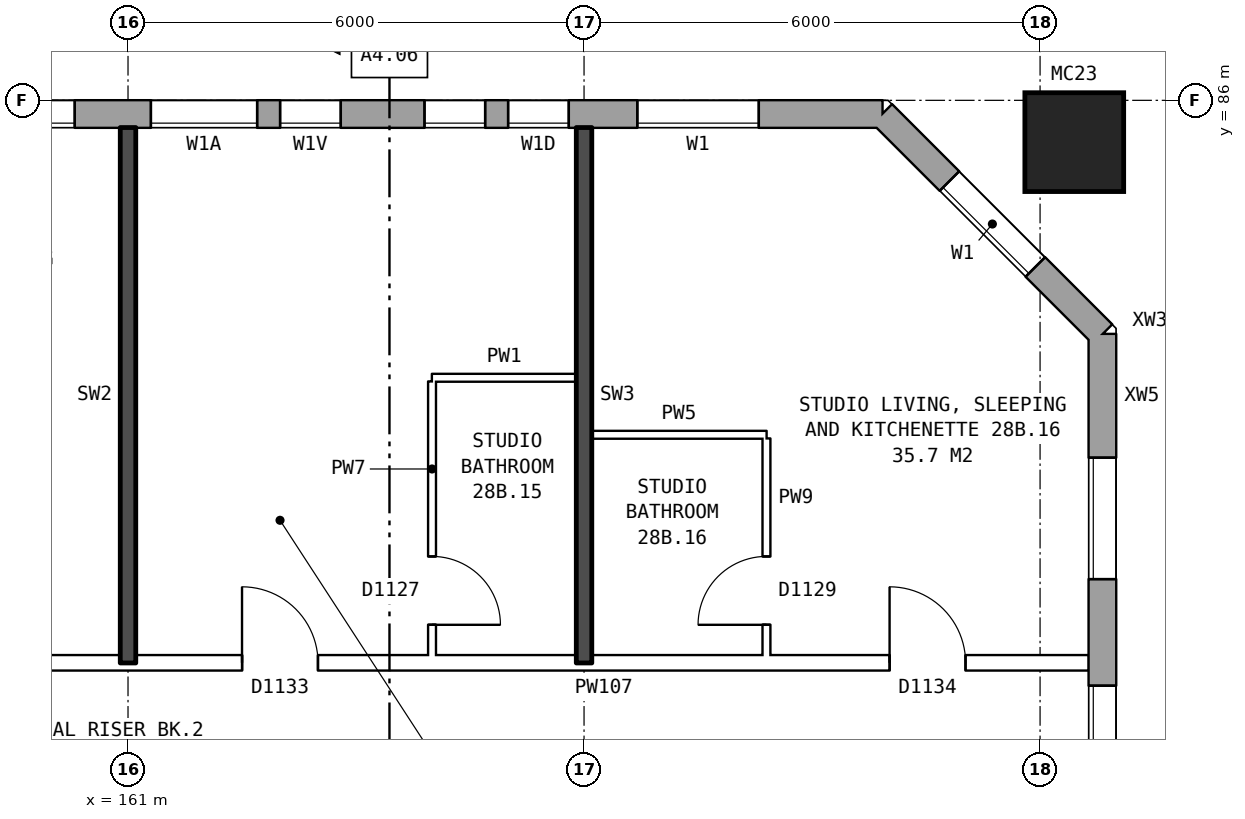
"""IFC4 building model, lengths in metres.
Left out: names, types, materials, properties, quantities, classifications, styles, units other than length and angle.
Written with IfcOpenShell. Run it as: python <this file> out.ifc"""

import sys

from ifc_helpers import new_model, si_unit, direction, frame, frame_2d, origin, origin_2d, place, context, subcontext, project, spatial, rectangle, hollow_rectangle, extrude, element, fill, save


model = new_model("IFC4")
c1 = context("Model", 3, precision=1e-05, world=origin(), true_north=direction((0.0, 1.0)))
c2 = subcontext(c1, "Body", "Model", "MODEL_VIEW")
j1 = project(units=[si_unit("LENGTHUNIT", "METRE"), si_unit("PLANEANGLEUNIT", "RADIAN")], contexts=[c1])
p1 = place(None, origin())
s1 = spatial("IfcSite", under=j1, at=p1, CompositionType="ELEMENT")
p2 = place(p1, origin())
s2 = spatial("IfcBuilding", under=s1, at=p2, CompositionType="ELEMENT")
p3 = place(p2, frame((0.0, 0.0, 102.6)))
s3 = spatial("IfcBuildingStorey", under=s2, at=p3, CompositionType="ELEMENT", Elevation=102.6)
p4 = place(p3, frame((173.45, 85.45, 0.0), z_axis=(0.0, 0.0, 1.0), x_axis=(1.0, 0.0, 0.0)))
e1 = element("IfcColumn", 1, at=p4, inside=s3, PredefinedType="COLUMN", context=c2, shape_type="SweptSolid", body=[
    extrude(hollow_rectangle(XDim=1.3, YDim=1.3, WallThickness=0.07, at=origin_2d()), origin(), (0.0, 0.0, 1.0), 3.1),
])
p5 = place(p3, frame((173.82, 57.075, 0.0), z_axis=(0.0, 0.0, 1.0), x_axis=(0.0, 1.0, 0.0)))
e2 = element("IfcWall", 2, at=p5, inside=s3, PredefinedType="STANDARD", context=c2, shape_type="SweptSolid", body=[
    extrude(rectangle(XDim=25.851, YDim=0.36, at=frame_2d((12.925, 0.0))), origin(), (0.0, 0.0, 1.0), 2.85),
])
p6 = place(p5, frame((1.625, 0.0, 0.8)))
e3 = element("IfcOpeningElement", 3, at=p6, cuts=e2, PredefinedType="OPENING", context=c2, shape_type="SweptSolid", body=[
    extrude(rectangle(XDim=1.6, YDim=1.8, at=frame_2d((0.8, 0.9))), frame((0.0, 0.19, 0.0), z_axis=(0.0, -1.0, 0.0), x_axis=(1.0, 0.0, 0.0)), (0.0, 0.0, 1.0), 0.38),
])
p7 = place(p5, frame((4.625, 0.0, 0.8)))
e4 = element("IfcOpeningElement", 4, at=p7, cuts=e2, PredefinedType="OPENING", context=c2, shape_type="SweptSolid", body=[
    extrude(rectangle(XDim=1.6, YDim=1.8, at=frame_2d((0.8, 0.9))), frame((0.0, 0.19, 0.0), z_axis=(0.0, -1.0, 0.0), x_axis=(1.0, 0.0, 0.0)), (0.0, 0.0, 1.0), 0.38),
])
p8 = place(p5, frame((7.625, 0.0, 0.8)))
e5 = element("IfcOpeningElement", 5, at=p8, cuts=e2, PredefinedType="OPENING", context=c2, shape_type="SweptSolid", body=[
    extrude(rectangle(XDim=1.6, YDim=1.8, at=frame_2d((0.8, 0.9))), frame((0.0, 0.19, 0.0), z_axis=(0.0, -1.0, 0.0), x_axis=(1.0, 0.0, 0.0)), (0.0, 0.0, 1.0), 0.38),
])
p9 = place(p5, frame((6.525, 0.0, 0.8)))
e6 = element("IfcOpeningElement", 6, at=p9, cuts=e2, PredefinedType="OPENING", context=c2, shape_type="SweptSolid", body=[
    extrude(rectangle(XDim=0.8, YDim=1.8, at=frame_2d((0.4, 0.9))), frame((0.0, 0.19, 0.0), z_axis=(0.0, -1.0, 0.0), x_axis=(1.0, 0.0, 0.0)), (0.0, 0.0, 1.0), 0.38),
])
p10 = place(p5, frame((9.525, 0.0, 1.7)))
e7 = element("IfcOpeningElement", 7, at=p10, cuts=e2, PredefinedType="OPENING", context=c2, shape_type="SweptSolid", body=[
    extrude(rectangle(XDim=0.8, YDim=0.9, at=frame_2d((0.4, 0.45))), frame((0.0, 0.19, 0.0), z_axis=(0.0, -1.0, 0.0), x_axis=(1.0, 0.0, 0.0)), (0.0, 0.0, 1.0), 0.38),
])
p11 = place(p5, frame((16.625, 0.0, 0.8)))
e8 = element("IfcOpeningElement", 8, at=p11, cuts=e2, PredefinedType="OPENING", context=c2, shape_type="SweptSolid", body=[
    extrude(rectangle(XDim=1.6, YDim=1.8, at=frame_2d((0.8, 0.9))), frame((0.0, 0.19, 0.0), z_axis=(0.0, -1.0, 0.0), x_axis=(1.0, 0.0, 0.0)), (0.0, 0.0, 1.0), 0.38),
])
p12 = place(p5, frame((19.625, 0.0, 0.8)))
e9 = element("IfcOpeningElement", 9, at=p12, cuts=e2, PredefinedType="OPENING", context=c2, shape_type="SweptSolid", body=[
    extrude(rectangle(XDim=1.6, YDim=1.8, at=frame_2d((0.8, 0.9))), frame((0.0, 0.19, 0.0), z_axis=(0.0, -1.0, 0.0), x_axis=(1.0, 0.0, 0.0)), (0.0, 0.0, 1.0), 0.38),
])
p13 = place(p5, frame((22.625, 0.0, 0.8)))
e10 = element("IfcOpeningElement", 10, at=p13, cuts=e2, PredefinedType="OPENING", context=c2, shape_type="SweptSolid", body=[
    extrude(rectangle(XDim=1.6, YDim=1.8, at=frame_2d((0.8, 0.9))), frame((0.0, 0.19, 0.0), z_axis=(0.0, -1.0, 0.0), x_axis=(1.0, 0.0, 0.0)), (0.0, 0.0, 1.0), 0.38),
])
p14 = place(p5, frame((11.425, 0.0, 0.8)))
e11 = element("IfcOpeningElement", 11, at=p14, cuts=e2, PredefinedType="OPENING", context=c2, shape_type="SweptSolid", body=[
    extrude(rectangle(XDim=0.6, YDim=0.9, at=frame_2d((0.3, 0.45))), frame((0.0, 0.19, 0.0), z_axis=(0.0, -1.0, 0.0), x_axis=(1.0, 0.0, 0.0)), (0.0, 0.0, 1.0), 0.38),
])
p15 = place(p5, frame((12.325, 0.0, 0.8)))
e12 = element("IfcOpeningElement", 12, at=p15, cuts=e2, PredefinedType="OPENING", context=c2, shape_type="SweptSolid", body=[
    extrude(rectangle(XDim=1.2, YDim=1.8, at=frame_2d((0.6, 0.9))), frame((0.0, 0.19, 0.0), z_axis=(0.0, -1.0, 0.0), x_axis=(1.0, 0.0, 0.0)), (0.0, 0.0, 1.0), 0.38),
])
p16 = place(p5, frame((13.825, 0.0, 0.8)))
e13 = element("IfcOpeningElement", 13, at=p16, cuts=e2, PredefinedType="OPENING", context=c2, shape_type="SweptSolid", body=[
    extrude(rectangle(XDim=0.6, YDim=0.9, at=frame_2d((0.3, 0.45))), frame((0.0, 0.19, 0.0), z_axis=(0.0, -1.0, 0.0), x_axis=(1.0, 0.0, 0.0)), (0.0, 0.0, 1.0), 0.38),
])
p17 = place(p5, frame((15.525, 0.0, 1.7)))
e14 = element("IfcOpeningElement", 14, at=p17, cuts=e2, PredefinedType="OPENING", context=c2, shape_type="SweptSolid", body=[
    extrude(rectangle(XDim=0.6, YDim=0.9, at=frame_2d((0.3, 0.45))), frame((0.0, 0.19, 0.0), z_axis=(0.0, -1.0, 0.0), x_axis=(1.0, 0.0, 0.0)), (0.0, 0.0, 1.0), 0.38),
])
p18 = place(p5, frame((18.525, 0.0, 0.8)))
e15 = element("IfcOpeningElement", 15, at=p18, cuts=e2, PredefinedType="OPENING", context=c2, shape_type="SweptSolid", body=[
    extrude(rectangle(XDim=0.8, YDim=1.8, at=frame_2d((0.4, 0.9))), frame((0.0, 0.19, 0.0), z_axis=(0.0, -1.0, 0.0), x_axis=(1.0, 0.0, 0.0)), (0.0, 0.0, 1.0), 0.38),
])
p19 = place(p3, frame((173.82, 82.925, 0.0), z_axis=(0.0, 0.0, 1.0), x_axis=(-0.707106781187, 0.707106781187, 0.0)))
e16 = element("IfcWall", 16, at=p19, inside=s3, PredefinedType="STANDARD", context=c2, shape_type="SweptSolid", body=[
    extrude(rectangle(XDim=4.094, YDim=0.36, at=frame_2d((2.047, 0.0))), origin(), (0.0, 0.0, 1.0), 2.85),
])
p20 = place(p19, frame((1.247, 0.0, 0.8)))
e17 = element("IfcOpeningElement", 17, at=p20, cuts=e16, PredefinedType="OPENING", context=c2, shape_type="SweptSolid", body=[
    extrude(rectangle(XDim=1.6, YDim=1.8, at=frame_2d((0.8, 0.9))), frame((0.0, 0.19, 0.0), z_axis=(0.0, -1.0, 0.0), x_axis=(1.0, 0.0, 0.0)), (0.0, 0.0, 1.0), 0.38),
])
p21 = place(p3, frame((170.925, 85.82, 0.0), z_axis=(0.0, 0.0, 1.0), x_axis=(-1.0, 0.0, 0.0)))
e18 = element("IfcWall", 18, at=p21, inside=s3, PredefinedType="STANDARD", context=c2, shape_type="SweptSolid", body=[
    extrude(rectangle(XDim=36.851, YDim=0.36, at=frame_2d((18.425, 0.0))), origin(), (0.0, 0.0, 1.0), 2.85),
])
p22 = place(p21, frame((1.625, 0.0, 0.8)))
e19 = element("IfcOpeningElement", 19, at=p22, cuts=e18, PredefinedType="OPENING", context=c2, shape_type="SweptSolid", body=[
    extrude(rectangle(XDim=1.6, YDim=1.8, at=frame_2d((0.8, 0.9))), frame((0.0, 0.19, 0.0), z_axis=(0.0, -1.0, 0.0), x_axis=(1.0, 0.0, 0.0)), (0.0, 0.0, 1.0), 0.38),
])
p23 = place(p21, frame((4.125, 0.0, 0.8)))
e20 = element("IfcOpeningElement", 20, at=p23, cuts=e18, PredefinedType="OPENING", context=c2, shape_type="SweptSolid", body=[
    extrude(rectangle(XDim=0.8, YDim=1.8, at=frame_2d((0.4, 0.9))), frame((0.0, 0.19, 0.0), z_axis=(0.0, -1.0, 0.0), x_axis=(1.0, 0.0, 0.0)), (0.0, 0.0, 1.0), 0.38),
])
p24 = place(p21, frame((5.225, 0.0, 1.7)))
e21 = element("IfcOpeningElement", 21, at=p24, cuts=e18, PredefinedType="OPENING", context=c2, shape_type="SweptSolid", body=[
    extrude(rectangle(XDim=0.8, YDim=0.9, at=frame_2d((0.4, 0.45))), frame((0.0, 0.19, 0.0), z_axis=(0.0, -1.0, 0.0), x_axis=(1.0, 0.0, 0.0)), (0.0, 0.0, 1.0), 0.38),
])
p25 = place(p21, frame((10.625, 0.0, 0.8)))
e22 = element("IfcOpeningElement", 22, at=p25, cuts=e18, PredefinedType="OPENING", context=c2, shape_type="SweptSolid", body=[
    extrude(rectangle(XDim=1.6, YDim=1.8, at=frame_2d((0.8, 0.9))), frame((0.0, 0.19, 0.0), z_axis=(0.0, -1.0, 0.0), x_axis=(1.0, 0.0, 0.0)), (0.0, 0.0, 1.0), 0.38),
])
p26 = place(p21, frame((13.625, 0.0, 0.8)))
e23 = element("IfcOpeningElement", 23, at=p26, cuts=e18, PredefinedType="OPENING", context=c2, shape_type="SweptSolid", body=[
    extrude(rectangle(XDim=1.6, YDim=1.8, at=frame_2d((0.8, 0.9))), frame((0.0, 0.19, 0.0), z_axis=(0.0, -1.0, 0.0), x_axis=(1.0, 0.0, 0.0)), (0.0, 0.0, 1.0), 0.38),
])
p27 = place(p21, frame((16.625, 0.0, 0.8)))
e24 = element("IfcOpeningElement", 24, at=p27, cuts=e18, PredefinedType="OPENING", context=c2, shape_type="SweptSolid", body=[
    extrude(rectangle(XDim=1.6, YDim=1.8, at=frame_2d((0.8, 0.9))), frame((0.0, 0.19, 0.0), z_axis=(0.0, -1.0, 0.0), x_axis=(1.0, 0.0, 0.0)), (0.0, 0.0, 1.0), 0.38),
])
p28 = place(p21, frame((19.625, 0.0, 0.8)))
e25 = element("IfcOpeningElement", 25, at=p28, cuts=e18, PredefinedType="OPENING", context=c2, shape_type="SweptSolid", body=[
    extrude(rectangle(XDim=1.6, YDim=1.8, at=frame_2d((0.8, 0.9))), frame((0.0, 0.19, 0.0), z_axis=(0.0, -1.0, 0.0), x_axis=(1.0, 0.0, 0.0)), (0.0, 0.0, 1.0), 0.38),
])
p29 = place(p21, frame((22.625, 0.0, 0.8)))
e26 = element("IfcOpeningElement", 26, at=p29, cuts=e18, PredefinedType="OPENING", context=c2, shape_type="SweptSolid", body=[
    extrude(rectangle(XDim=1.6, YDim=1.8, at=frame_2d((0.8, 0.9))), frame((0.0, 0.19, 0.0), z_axis=(0.0, -1.0, 0.0), x_axis=(1.0, 0.0, 0.0)), (0.0, 0.0, 1.0), 0.38),
])
p30 = place(p21, frame((25.625, 0.0, 0.8)))
e27 = element("IfcOpeningElement", 27, at=p30, cuts=e18, PredefinedType="OPENING", context=c2, shape_type="SweptSolid", body=[
    extrude(rectangle(XDim=1.6, YDim=1.8, at=frame_2d((0.8, 0.9))), frame((0.0, 0.19, 0.0), z_axis=(0.0, -1.0, 0.0), x_axis=(1.0, 0.0, 0.0)), (0.0, 0.0, 1.0), 0.38),
])
p31 = place(p21, frame((28.125, 0.0, 0.8)))
e28 = element("IfcOpeningElement", 28, at=p31, cuts=e18, PredefinedType="OPENING", context=c2, shape_type="SweptSolid", body=[
    extrude(rectangle(XDim=1.2, YDim=1.2, at=frame_2d((0.6, 0.6))), frame((0.0, 0.19, 0.0), z_axis=(0.0, -1.0, 0.0), x_axis=(1.0, 0.0, 0.0)), (0.0, 0.0, 1.0), 0.38),
])
p32 = place(p21, frame((31.625, 0.0, 0.8)))
e29 = element("IfcOpeningElement", 29, at=p32, cuts=e18, PredefinedType="OPENING", context=c2, shape_type="SweptSolid", body=[
    extrude(rectangle(XDim=1.6, YDim=1.8, at=frame_2d((0.8, 0.9))), frame((0.0, 0.19, 0.0), z_axis=(0.0, -1.0, 0.0), x_axis=(1.0, 0.0, 0.0)), (0.0, 0.0, 1.0), 0.38),
])
p33 = place(p21, frame((34.625, 0.0, 0.8)))
e30 = element("IfcOpeningElement", 30, at=p33, cuts=e18, PredefinedType="OPENING", context=c2, shape_type="SweptSolid", body=[
    extrude(rectangle(XDim=1.6, YDim=1.8, at=frame_2d((0.8, 0.9))), frame((0.0, 0.19, 0.0), z_axis=(0.0, -1.0, 0.0), x_axis=(1.0, 0.0, 0.0)), (0.0, 0.0, 1.0), 0.38),
])
p34 = place(p21, frame((7.125, 0.0, 0.8)))
e31 = element("IfcOpeningElement", 31, at=p34, cuts=e18, PredefinedType="OPENING", context=c2, shape_type="SweptSolid", body=[
    extrude(rectangle(XDim=0.8, YDim=0.9, at=frame_2d((0.4, 0.45))), frame((0.0, 0.19, 0.0), z_axis=(0.0, -1.0, 0.0), x_axis=(1.0, 0.0, 0.0)), (0.0, 0.0, 1.0), 0.38),
])
p35 = place(p21, frame((8.225, 0.0, 0.8)))
e32 = element("IfcOpeningElement", 32, at=p35, cuts=e18, PredefinedType="OPENING", context=c2, shape_type="SweptSolid", body=[
    extrude(rectangle(XDim=1.4, YDim=1.8, at=frame_2d((0.7, 0.9))), frame((0.0, 0.19, 0.0), z_axis=(0.0, -1.0, 0.0), x_axis=(1.0, 0.0, 0.0)), (0.0, 0.0, 1.0), 0.38),
])
p36 = place(p3, frame((155.1, 78.6, 0.0), z_axis=(0.0, 0.0, 1.0), x_axis=(1.0, 0.0, 0.0)))
e33 = element("IfcWall", 33, at=p36, inside=s3, PredefinedType="PARTITIONING", context=c2, shape_type="SweptSolid", body=[
    extrude(rectangle(XDim=18.54, YDim=0.2, at=frame_2d((9.27, 0.0))), origin(), (0.0, 0.0, 1.0), 2.85),
])
p37 = place(p36, frame((3.6, 0.0, 0.0)))
e34 = element("IfcOpeningElement", 34, at=p37, cuts=e33, PredefinedType="OPENING", context=c2, shape_type="SweptSolid", body=[
    extrude(rectangle(XDim=1.0, YDim=2.1, at=frame_2d((0.5, 1.05))), frame((0.0, 0.11, 0.0), z_axis=(0.0, -1.0, 0.0), x_axis=(1.0, 0.0, 0.0)), (0.0, 0.0, 1.0), 0.22),
])
p38 = place(p36, frame((7.4, 0.0, 0.0)))
e35 = element("IfcOpeningElement", 35, at=p38, cuts=e33, PredefinedType="OPENING", context=c2, shape_type="SweptSolid", body=[
    extrude(rectangle(XDim=1.0, YDim=2.1, at=frame_2d((0.5, 1.05))), frame((0.0, 0.11, 0.0), z_axis=(0.0, -1.0, 0.0), x_axis=(1.0, 0.0, 0.0)), (0.0, 0.0, 1.0), 0.22),
])
p39 = place(p36, frame((15.92, 0.0, 0.0)))
e36 = element("IfcOpeningElement", 36, at=p39, cuts=e33, PredefinedType="OPENING", context=c2, shape_type="SweptSolid", body=[
    extrude(rectangle(XDim=1.0, YDim=2.1, at=frame_2d((0.5, 1.05))), frame((0.0, 0.11, 0.0), z_axis=(0.0, -1.0, 0.0), x_axis=(1.0, 0.0, 0.0)), (0.0, 0.0, 1.0), 0.22),
])
p40 = place(p3, frame((167.1, 81.6, 0.0), z_axis=(0.0, 0.0, 1.0), x_axis=(1.0, 0.0, 0.0)))
e37 = element("IfcWall", 37, at=p40, inside=s3, PredefinedType="PARTITIONING", context=c2, shape_type="SweptSolid", body=[
    extrude(rectangle(XDim=2.3, YDim=0.1, at=frame_2d((1.15, 0.0))), origin(), (0.0, 0.0, 1.0), 2.85),
])
p41 = place(p3, frame((165.0, 82.35, 0.0), z_axis=(0.0, 0.0, 1.0), x_axis=(1.0, 0.0, 0.0)))
e38 = element("IfcWall", 38, at=p41, inside=s3, PredefinedType="PARTITIONING", context=c2, shape_type="SweptSolid", body=[
    extrude(rectangle(XDim=1.9, YDim=0.1, at=frame_2d((0.95, 0.0))), origin(), (0.0, 0.0, 1.0), 2.85),
])
p42 = place(p3, frame((161.0, 78.6, 0.0), z_axis=(0.0, 0.0, 1.0), x_axis=(0.0, 1.0, 0.0)))
e39 = element("IfcWall", 39, at=p42, inside=s3, PredefinedType="SOLIDWALL", context=c2, shape_type="SweptSolid", body=[
    extrude(rectangle(XDim=7.04, YDim=0.2, at=frame_2d((3.52, 0.0))), origin(), (0.0, 0.0, 1.0), 2.85),
])
p43 = place(p3, frame((165.0, 78.7, 0.0), z_axis=(0.0, 0.0, 1.0), x_axis=(0.0, 1.0, 0.0)))
e40 = element("IfcWall", 40, at=p43, inside=s3, PredefinedType="PARTITIONING", context=c2, shape_type="SweptSolid", body=[
    extrude(rectangle(XDim=3.6, YDim=0.1, at=frame_2d((1.8, 0.0))), origin(), (0.0, 0.0, 1.0), 2.85),
])
p44 = place(p43, frame((0.4, 0.0, 0.0)))
e41 = element("IfcOpeningElement", 41, at=p44, cuts=e40, PredefinedType="OPENING", context=c2, shape_type="SweptSolid", body=[
    extrude(rectangle(XDim=0.9, YDim=2.1, at=frame_2d((0.45, 1.05))), frame((0.0, 0.06, 0.0), z_axis=(0.0, -1.0, 0.0), x_axis=(1.0, 0.0, 0.0)), (0.0, 0.0, 1.0), 0.12),
])
p45 = place(p3, frame((167.0, 78.6, 0.0), z_axis=(0.0, 0.0, 1.0), x_axis=(0.0, 1.0, 0.0)))
e42 = element("IfcWall", 42, at=p45, inside=s3, PredefinedType="SOLIDWALL", context=c2, shape_type="SweptSolid", body=[
    extrude(rectangle(XDim=7.04, YDim=0.2, at=frame_2d((3.52, 0.0))), origin(), (0.0, 0.0, 1.0), 2.85),
])
p46 = place(p3, frame((169.4, 78.7, 0.0), z_axis=(0.0, 0.0, 1.0), x_axis=(0.0, 1.0, 0.0)))
e43 = element("IfcWall", 43, at=p46, inside=s3, PredefinedType="PARTITIONING", context=c2, shape_type="SweptSolid", body=[
    extrude(rectangle(XDim=2.85, YDim=0.1, at=frame_2d((1.425, 0.0))), origin(), (0.0, 0.0, 1.0), 2.85),
])
p47 = place(p46, frame((0.4, 0.0, 0.0)))
e44 = element("IfcOpeningElement", 44, at=p47, cuts=e43, PredefinedType="OPENING", context=c2, shape_type="SweptSolid", body=[
    extrude(rectangle(XDim=0.9, YDim=2.1, at=frame_2d((0.45, 1.05))), frame((0.0, 0.06, 0.0), z_axis=(0.0, -1.0, 0.0), x_axis=(1.0, 0.0, 0.0)), (0.0, 0.0, 1.0), 0.12),
])
p48 = place(p12, origin())
e45 = element("IfcWindow", 45, at=p48, inside=s3, PartitioningType="SINGLE_PANEL", PredefinedType="WINDOW", context=c2, shape_type="SweptSolid", body=[
    extrude(rectangle(XDim=1.6, YDim=1.8, at=frame_2d((0.8, 0.9))), frame((0.0, 0.15, 0.0), z_axis=(0.0, -1.0, 0.0), x_axis=(1.0, 0.0, 0.0)), (0.0, 0.0, 1.0), 0.06),
])
fill(e9, e45)
p49 = place(p13, origin())
e46 = element("IfcWindow", 46, at=p49, inside=s3, PartitioningType="SINGLE_PANEL", PredefinedType="WINDOW", context=c2, shape_type="SweptSolid", body=[
    extrude(rectangle(XDim=1.6, YDim=1.8, at=frame_2d((0.8, 0.9))), frame((0.0, 0.15, 0.0), z_axis=(0.0, -1.0, 0.0), x_axis=(1.0, 0.0, 0.0)), (0.0, 0.0, 1.0), 0.06),
])
fill(e10, e46)
p50 = place(p20, origin())
e47 = element("IfcWindow", 47, at=p50, inside=s3, PartitioningType="SINGLE_PANEL", PredefinedType="WINDOW", context=c2, shape_type="SweptSolid", body=[
    extrude(rectangle(XDim=1.6, YDim=1.8, at=frame_2d((0.8, 0.9))), frame((0.0, 0.15, 0.0), z_axis=(0.0, -1.0, 0.0), x_axis=(1.0, 0.0, 0.0)), (0.0, 0.0, 1.0), 0.06),
])
fill(e17, e47)
p51 = place(p22, origin())
e48 = element("IfcWindow", 48, at=p51, inside=s3, PartitioningType="SINGLE_PANEL", PredefinedType="WINDOW", context=c2, shape_type="SweptSolid", body=[
    extrude(rectangle(XDim=1.6, YDim=1.8, at=frame_2d((0.8, 0.9))), frame((0.0, 0.15, 0.0), z_axis=(0.0, -1.0, 0.0), x_axis=(1.0, 0.0, 0.0)), (0.0, 0.0, 1.0), 0.06),
])
fill(e19, e48)
p52 = place(p23, origin())
e49 = element("IfcWindow", 49, at=p52, inside=s3, PartitioningType="SINGLE_PANEL", PredefinedType="WINDOW", context=c2, shape_type="SweptSolid", body=[
    extrude(rectangle(XDim=0.8, YDim=1.8, at=frame_2d((0.4, 0.9))), frame((0.0, 0.15, 0.0), z_axis=(0.0, -1.0, 0.0), x_axis=(1.0, 0.0, 0.0)), (0.0, 0.0, 1.0), 0.06),
])
fill(e20, e49)
p53 = place(p24, origin())
e50 = element("IfcWindow", 50, at=p53, inside=s3, PartitioningType="SINGLE_PANEL", PredefinedType="WINDOW", context=c2, shape_type="SweptSolid", body=[
    extrude(rectangle(XDim=0.8, YDim=0.9, at=frame_2d((0.4, 0.45))), frame((0.0, 0.15, 0.0), z_axis=(0.0, -1.0, 0.0), x_axis=(1.0, 0.0, 0.0)), (0.0, 0.0, 1.0), 0.06),
])
fill(e21, e50)
p54 = place(p25, origin())
e51 = element("IfcWindow", 51, at=p54, inside=s3, PartitioningType="SINGLE_PANEL", PredefinedType="WINDOW", context=c2, shape_type="SweptSolid", body=[
    extrude(rectangle(XDim=1.6, YDim=1.8, at=frame_2d((0.8, 0.9))), frame((0.0, 0.15, 0.0), z_axis=(0.0, -1.0, 0.0), x_axis=(1.0, 0.0, 0.0)), (0.0, 0.0, 1.0), 0.06),
])
fill(e22, e51)
p55 = place(p38, origin())
e52 = element("IfcDoor", 52, at=p55, inside=s3, OperationType="SINGLE_SWING_LEFT", PredefinedType="DOOR", context=c2, shape_type="SweptSolid", body=[
    extrude(rectangle(XDim=1.0, YDim=2.1, at=frame_2d((0.5, 1.05))), frame((0.0, 0.025, 0.0), z_axis=(0.0, -1.0, 0.0), x_axis=(1.0, 0.0, 0.0)), (0.0, 0.0, 1.0), 0.05),
])
fill(e35, e52)
p56 = place(p44, frame((0.9, 0.0, 0.0), z_axis=(0.0, 0.0, 1.0), x_axis=(-1.0, 0.0, 0.0)))
e53 = element("IfcDoor", 53, at=p56, inside=s3, OperationType="SINGLE_SWING_RIGHT", PredefinedType="DOOR", context=c2, shape_type="SweptSolid", body=[
    extrude(rectangle(XDim=0.9, YDim=2.1, at=frame_2d((0.45, 1.05))), frame((0.0, 0.025, 0.0), z_axis=(0.0, -1.0, 0.0), x_axis=(1.0, 0.0, 0.0)), (0.0, 0.0, 1.0), 0.05),
])
fill(e41, e53)
p57 = place(p39, origin())
e54 = element("IfcDoor", 54, at=p57, inside=s3, OperationType="SINGLE_SWING_LEFT", PredefinedType="DOOR", context=c2, shape_type="SweptSolid", body=[
    extrude(rectangle(XDim=1.0, YDim=2.1, at=frame_2d((0.5, 1.05))), frame((0.0, 0.025, 0.0), z_axis=(0.0, -1.0, 0.0), x_axis=(1.0, 0.0, 0.0)), (0.0, 0.0, 1.0), 0.05),
])
fill(e36, e54)
p58 = place(p47, origin())
e55 = element("IfcDoor", 55, at=p58, inside=s3, OperationType="SINGLE_SWING_LEFT", PredefinedType="DOOR", context=c2, shape_type="SweptSolid", body=[
    extrude(rectangle(XDim=0.9, YDim=2.1, at=frame_2d((0.45, 1.05))), frame((0.0, 0.025, 0.0), z_axis=(0.0, -1.0, 0.0), x_axis=(1.0, 0.0, 0.0)), (0.0, 0.0, 1.0), 0.05),
])
fill(e44, e55)
p59 = place(p34, origin())
e56 = element("IfcWindow", 56, at=p59, inside=s3, PartitioningType="SINGLE_PANEL", PredefinedType="WINDOW", context=c2, shape_type="SweptSolid", body=[
    extrude(rectangle(XDim=0.8, YDim=0.9, at=frame_2d((0.4, 0.45))), frame((0.0, 0.15, 0.0), z_axis=(0.0, -1.0, 0.0), x_axis=(1.0, 0.0, 0.0)), (0.0, 0.0, 1.0), 0.06),
])
fill(e31, e56)
p60 = place(p35, origin())
e57 = element("IfcWindow", 57, at=p60, inside=s3, PartitioningType="SINGLE_PANEL", PredefinedType="WINDOW", context=c2, shape_type="SweptSolid", body=[
    extrude(rectangle(XDim=1.4, YDim=1.8, at=frame_2d((0.7, 0.9))), frame((0.0, 0.15, 0.0), z_axis=(0.0, -1.0, 0.0), x_axis=(1.0, 0.0, 0.0)), (0.0, 0.0, 1.0), 0.06),
])
fill(e32, e57)
save(model, sys.argv[1])
